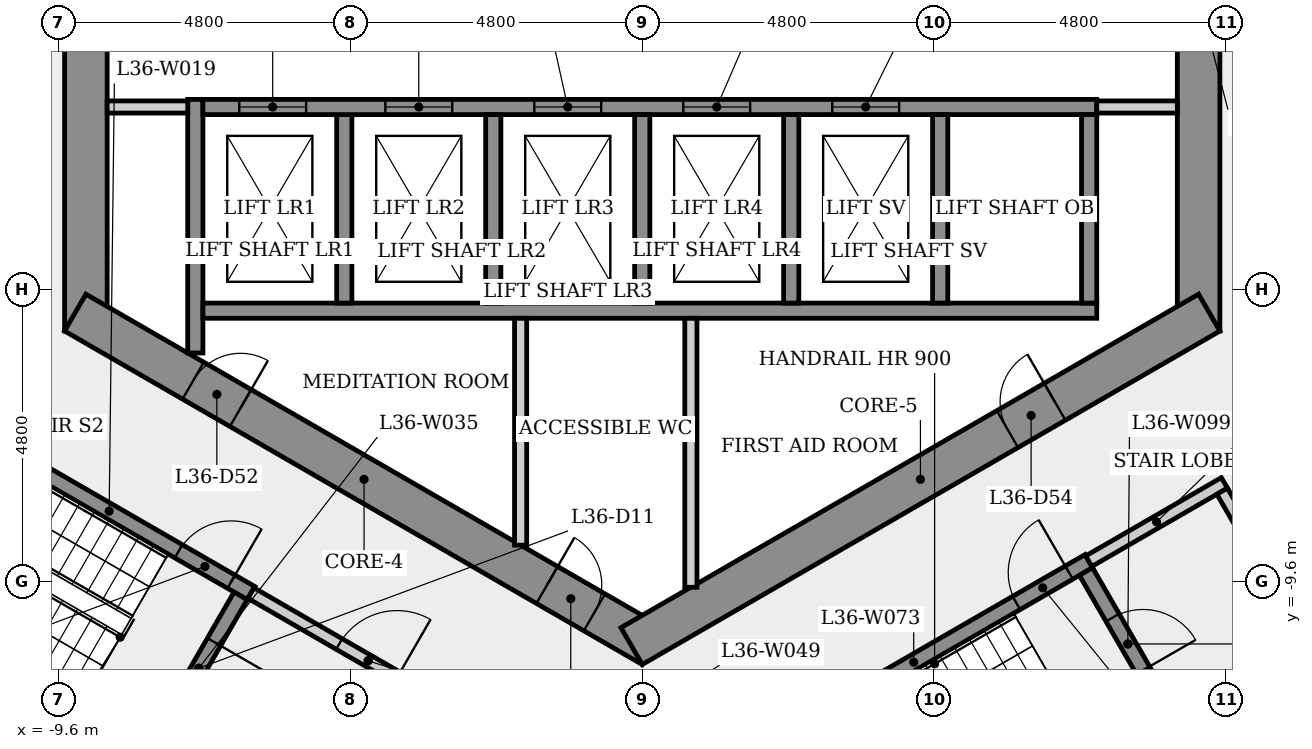
"""IFC4 building model, lengths in metres.
Left out: names, types, materials, properties, quantities, classifications, styles, units other than length and angle.
Written with IfcOpenShell. Run it as: python <this file> out.ifc"""

import sys

from ifc_helpers import new_model, si_unit, direction, frame, frame_2d, origin, place, context, subcontext, project, spatial, rectangle, extrude, element, fill, save


model = new_model("IFC4")
c1 = context("Model", 3, precision=1e-05, world=origin(), true_north=direction((0.0, 1.0)))
c2 = subcontext(c1, "Body", "Model", "MODEL_VIEW")
j1 = project(units=[si_unit("LENGTHUNIT", "METRE"), si_unit("PLANEANGLEUNIT", "RADIAN")], contexts=[c1])
p1 = place(None, origin())
s1 = spatial("IfcSite", under=j1, at=p1, CompositionType="ELEMENT")
p2 = place(p1, origin())
s2 = spatial("IfcBuilding", under=s1, at=p2, CompositionType="ELEMENT")
p3 = place(p2, frame((0.0, 0.0, 135.9)))
s3 = spatial("IfcBuildingStorey", under=s2, at=p3, CompositionType="ELEMENT", Elevation=135.9)
p4 = place(p3, frame((9.15, -5.485, 0.0), z_axis=(0.0, 0.0, 1.0), x_axis=(0.0, 1.0, 0.0)))
e1 = element("IfcWall", 1, at=p4, inside=s3, PredefinedType="SHEAR", context=c2, shape_type="SweptSolid", body=[
    extrude(rectangle(XDim=10.97, YDim=0.7, at=frame_2d((5.485, 0.0))), origin(), (0.0, 0.0, 1.0), 4.0),
])
p5 = place(p4, frame((4.685, 0.0, 0.0)))
e2 = element("IfcOpeningElement", 2, at=p5, cuts=e1, PredefinedType="OPENING", context=c2, shape_type="SweptSolid", body=[
    extrude(rectangle(XDim=1.6, YDim=2.1, at=frame_2d((0.8, 1.05))), frame((0.0, 0.36, 0.0), z_axis=(0.0, -1.0, 0.0), x_axis=(1.0, 0.0, 0.0)), (0.0, 0.0, 1.0), 0.72),
])
p6 = place(p3, frame((-9.15, 5.485, 0.0), z_axis=(0.0, 0.0, 1.0), x_axis=(0.0, -1.0, 0.0)))
e3 = element("IfcWall", 3, at=p6, inside=s3, PredefinedType="SHEAR", context=c2, shape_type="SweptSolid", body=[
    extrude(rectangle(XDim=10.97, YDim=0.7, at=frame_2d((5.485, 0.0))), origin(), (0.0, 0.0, 1.0), 4.0),
])
p7 = place(p6, frame((4.685, 0.0, 0.0)))
e4 = element("IfcOpeningElement", 4, at=p7, cuts=e3, PredefinedType="OPENING", context=c2, shape_type="SweptSolid", body=[
    extrude(rectangle(XDim=1.6, YDim=2.1, at=frame_2d((0.8, 1.05))), frame((0.0, 0.36, 0.0), z_axis=(0.0, -1.0, 0.0), x_axis=(1.0, 0.0, 0.0)), (0.0, 0.0, 1.0), 0.72),
])
p8 = place(p3, frame((-9.325, -5.182, 0.0), z_axis=(0.0, 0.0, 1.0), x_axis=(0.866023993627, -0.500002442456, 0.0)))
e5 = element("IfcWall", 5, at=p8, inside=s3, PredefinedType="SHEAR", context=c2, shape_type="SweptSolid", body=[
    extrude(rectangle(XDim=10.97, YDim=0.7, at=frame_2d((5.485, 0.0))), origin(), (0.0, 0.0, 1.0), 4.0),
])
p9 = place(p8, frame((2.239, 0.0, 0.0)))
e6 = element("IfcOpeningElement", 6, at=p9, cuts=e5, PredefinedType="OPENING", context=c2, shape_type="SweptSolid", body=[
    extrude(rectangle(XDim=0.9, YDim=2.1, at=frame_2d((0.45, 1.05))), frame((0.0, 0.36, 0.0), z_axis=(0.0, -1.0, 0.0), x_axis=(1.0, 0.0, 0.0)), (0.0, 0.0, 1.0), 0.72),
])
p10 = place(p8, frame((8.96, 0.0, 0.0)))
e7 = element("IfcOpeningElement", 7, at=p10, cuts=e5, PredefinedType="OPENING", context=c2, shape_type="SweptSolid", body=[
    extrude(rectangle(XDim=0.9, YDim=2.1, at=frame_2d((0.45, 1.05))), frame((0.0, 0.36, 0.0), z_axis=(0.0, -1.0, 0.0), x_axis=(1.0, 0.0, 0.0)), (0.0, 0.0, 1.0), 0.72),
])
p11 = place(p3, frame((-0.175, -10.667, 0.0), z_axis=(0.0, 0.0, 1.0), x_axis=(0.866023993627, 0.500002442456, 0.0)))
e8 = element("IfcWall", 8, at=p11, inside=s3, PredefinedType="SHEAR", context=c2, shape_type="SweptSolid", body=[
    extrude(rectangle(XDim=10.97, YDim=0.7, at=frame_2d((5.485, 0.0))), origin(), (0.0, 0.0, 1.0), 4.0),
])
p12 = place(p11, frame((7.137, 0.0, 0.0)))
e9 = element("IfcOpeningElement", 9, at=p12, cuts=e8, PredefinedType="OPENING", context=c2, shape_type="SweptSolid", body=[
    extrude(rectangle(XDim=0.9, YDim=2.1, at=frame_2d((0.45, 1.05))), frame((0.0, 0.36, 0.0), z_axis=(0.0, -1.0, 0.0), x_axis=(1.0, 0.0, 0.0)), (0.0, 0.0, 1.0), 0.72),
])
p13 = place(p3, frame((-11.1, -7.101, 0.0), z_axis=(0.0, 0.0, 1.0), x_axis=(0.866028615007, -0.499994437958, 0.0)))
e10 = element("IfcWall", 10, at=p13, inside=s3, PredefinedType="SHEAR", context=c2, shape_type="SweptSolid", body=[
    extrude(rectangle(XDim=5.387, YDim=0.25, at=frame_2d((2.694, 0.0))), origin(), (0.0, 0.0, 1.0), 3.6),
])
p14 = place(p13, frame((4.012, 0.0, 0.0)))
e11 = element("IfcOpeningElement", 11, at=p14, cuts=e10, PredefinedType="OPENING", context=c2, shape_type="SweptSolid", body=[
    extrude(rectangle(XDim=1.0, YDim=2.1, at=frame_2d((0.5, 1.05))), frame((0.0, 0.135, 0.0), z_axis=(0.0, -1.0, 0.0), x_axis=(1.0, 0.0, 0.0)), (0.0, 0.0, 1.0), 0.27),
])
p15 = place(p3, frame((-7.935, -12.393, 0.0), z_axis=(0.0, 0.0, 1.0), x_axis=(-0.866025499775, 0.499999833739, 0.0)))
e12 = element("IfcWall", 12, at=p15, inside=s3, PredefinedType="SHEAR", context=c2, shape_type="SweptSolid", body=[
    extrude(rectangle(XDim=6.4, YDim=0.25, at=frame_2d((3.2, 0.0))), origin(), (0.0, 0.0, 1.0), 3.6),
])
p16 = place(p3, frame((-7.35, -5.846, 0.0), z_axis=(0.0, 0.0, 1.0), x_axis=(0.0, 1.0, 0.0)))
e13 = element("IfcWall", 13, at=p16, inside=s3, PredefinedType="SHEAR", context=c2, shape_type="SweptSolid", body=[
    extrude(rectangle(XDim=4.171, YDim=0.25, at=frame_2d((2.085, 0.0))), origin(), (0.0, 0.0, 1.0), 3.6),
])
p17 = place(p3, frame((-7.475, -1.8, 0.0), z_axis=(0.0, 0.0, 1.0), x_axis=(-1.0, 0.0, 0.0)))
e14 = element("IfcWall", 14, at=p17, inside=s3, PredefinedType="PARTITIONING", context=c2, shape_type="SweptSolid", body=[
    extrude(rectangle(XDim=1.325, YDim=0.2, at=frame_2d((0.663, 0.0))), origin(), (0.0, 0.0, 1.0), 3.6),
])
p18 = place(p3, frame((-6.605, -9.841, 0.0), z_axis=(0.0, 0.0, 1.0), x_axis=(-0.499996545922, -0.866027397988, 0.0)))
e15 = element("IfcWall", 15, at=p18, inside=s3, PredefinedType="SHEAR", context=c2, shape_type="SweptSolid", body=[
    extrude(rectangle(XDim=2.75, YDim=0.25, at=frame_2d((1.375, 0.0))), origin(), (0.0, 0.0, 1.0), 3.6),
])
p19 = place(p18, frame((0.875, 0.0, 0.0)))
e16 = element("IfcOpeningElement", 16, at=p19, cuts=e15, PredefinedType="OPENING", context=c2, shape_type="SweptSolid", body=[
    extrude(rectangle(XDim=1.0, YDim=2.1, at=frame_2d((0.5, 1.05))), frame((0.0, 0.135, 0.0), z_axis=(0.0, -1.0, 0.0), x_axis=(1.0, 0.0, 0.0)), (0.0, 0.0, 1.0), 0.27),
])
p20 = place(p3, frame((-6.435, -9.795, 0.0), z_axis=(0.0, 0.0, 1.0), x_axis=(0.866012907634, -0.500021643343, 0.0)))
e17 = element("IfcWall", 17, at=p20, inside=s3, PredefinedType="PARTITIONING", context=c2, shape_type="SweptSolid", body=[
    extrude(rectangle(XDim=4.45, YDim=0.2, at=frame_2d((2.225, 0.0))), origin(), (0.0, 0.0, 1.0), 3.6),
])
p21 = place(p20, frame((1.675, 0.0, 0.0)))
e18 = element("IfcOpeningElement", 18, at=p21, cuts=e17, PredefinedType="OPENING", context=c2, shape_type="SweptSolid", body=[
    extrude(rectangle(XDim=1.1, YDim=2.1, at=frame_2d((0.55, 1.05))), frame((0.0, 0.11, 0.0), z_axis=(0.0, -1.0, 0.0), x_axis=(1.0, 0.0, 0.0)), (0.0, 0.0, 1.0), 0.22),
])
p22 = place(p3, frame((-7.225, -5.15, 0.0), z_axis=(0.0, 0.0, 1.0), x_axis=(1.0, 0.0, 0.0)))
e19 = element("IfcWall", 19, at=p22, inside=s3, PredefinedType="SHEAR", context=c2, shape_type="SweptSolid", body=[
    extrude(rectangle(XDim=14.7, YDim=0.25, at=frame_2d((7.35, 0.0))), origin(), (0.0, 0.0, 1.0), 3.6),
])
p23 = place(p3, frame((-4.9, -1.925, 0.0), z_axis=(0.0, 0.0, 1.0), x_axis=(0.0, -1.0, 0.0)))
e20 = element("IfcWall", 20, at=p23, inside=s3, PredefinedType="SHEAR", context=c2, shape_type="SweptSolid", body=[
    extrude(rectangle(XDim=3.1, YDim=0.25, at=frame_2d((1.55, 0.0))), origin(), (0.0, 0.0, 1.0), 4.0),
])
p24 = place(p3, frame((-7.225, -1.8, 0.0), z_axis=(0.0, 0.0, 1.0), x_axis=(1.0, 0.0, 0.0)))
e21 = element("IfcWall", 21, at=p24, inside=s3, PredefinedType="SHEAR", context=c2, shape_type="SweptSolid", body=[
    extrude(rectangle(XDim=14.7, YDim=0.25, at=frame_2d((7.35, 0.0))), origin(), (0.0, 0.0, 1.0), 3.6),
])
p25 = place(p24, frame((0.597, 0.0, 0.0)))
e22 = element("IfcOpeningElement", 22, at=p25, cuts=e21, PredefinedType="OPENING", context=c2, shape_type="SweptSolid", body=[
    extrude(rectangle(XDim=1.1, YDim=2.1, at=frame_2d((0.55, 1.05))), frame((0.0, 0.135, 0.0), z_axis=(0.0, -1.0, 0.0), x_axis=(1.0, 0.0, 0.0)), (0.0, 0.0, 1.0), 0.27),
])
p26 = place(p24, frame((3.0, 0.0, 0.0)))
e23 = element("IfcOpeningElement", 23, at=p26, cuts=e21, PredefinedType="OPENING", context=c2, shape_type="SweptSolid", body=[
    extrude(rectangle(XDim=1.1, YDim=2.1, at=frame_2d((0.55, 1.05))), frame((0.0, 0.135, 0.0), z_axis=(0.0, -1.0, 0.0), x_axis=(1.0, 0.0, 0.0)), (0.0, 0.0, 1.0), 0.27),
])
p27 = place(p24, frame((5.45, 0.0, 0.0)))
e24 = element("IfcOpeningElement", 24, at=p27, cuts=e21, PredefinedType="OPENING", context=c2, shape_type="SweptSolid", body=[
    extrude(rectangle(XDim=1.1, YDim=2.1, at=frame_2d((0.55, 1.05))), frame((0.0, 0.135, 0.0), z_axis=(0.0, -1.0, 0.0), x_axis=(1.0, 0.0, 0.0)), (0.0, 0.0, 1.0), 0.27),
])
p28 = place(p24, frame((7.9, 0.0, 0.0)))
e25 = element("IfcOpeningElement", 25, at=p28, cuts=e21, PredefinedType="OPENING", context=c2, shape_type="SweptSolid", body=[
    extrude(rectangle(XDim=1.1, YDim=2.1, at=frame_2d((0.55, 1.05))), frame((0.0, 0.135, 0.0), z_axis=(0.0, -1.0, 0.0), x_axis=(1.0, 0.0, 0.0)), (0.0, 0.0, 1.0), 0.27),
])
p29 = place(p24, frame((10.35, 0.0, 0.0)))
e26 = element("IfcOpeningElement", 26, at=p29, cuts=e21, PredefinedType="OPENING", context=c2, shape_type="SweptSolid", body=[
    extrude(rectangle(XDim=1.1, YDim=2.1, at=frame_2d((0.55, 1.05))), frame((0.0, 0.135, 0.0), z_axis=(0.0, -1.0, 0.0), x_axis=(1.0, 0.0, 0.0)), (0.0, 0.0, 1.0), 0.27),
])
p30 = place(p3, frame((-2.45, -1.925, 0.0), z_axis=(0.0, 0.0, 1.0), x_axis=(0.0, -1.0, 0.0)))
e27 = element("IfcWall", 27, at=p30, inside=s3, PredefinedType="SHEAR", context=c2, shape_type="SweptSolid", body=[
    extrude(rectangle(XDim=3.1, YDim=0.25, at=frame_2d((1.55, 0.0))), origin(), (0.0, 0.0, 1.0), 4.0),
])
p31 = place(p3, frame((-2.0, -5.275, 0.0), z_axis=(0.0, 0.0, 1.0), x_axis=(0.0, -1.0, 0.0)))
e28 = element("IfcWall", 28, at=p31, inside=s3, PredefinedType="PARTITIONING", context=c2, shape_type="SweptSolid", body=[
    extrude(rectangle(XDim=3.732, YDim=0.2, at=frame_2d((1.866, 0.0))), origin(), (0.0, 0.0, 1.0), 3.6),
])
p32 = place(p3, frame((0.0, -1.925, 0.0), z_axis=(0.0, 0.0, 1.0), x_axis=(0.0, -1.0, 0.0)))
e29 = element("IfcWall", 29, at=p32, inside=s3, PredefinedType="SHEAR", context=c2, shape_type="SweptSolid", body=[
    extrude(rectangle(XDim=3.1, YDim=0.25, at=frame_2d((1.55, 0.0))), origin(), (0.0, 0.0, 1.0), 4.0),
])
p33 = place(p3, frame((0.8, -5.275, 0.0), z_axis=(0.0, 0.0, 1.0), x_axis=(0.0, -1.0, 0.0)))
e30 = element("IfcWall", 30, at=p33, inside=s3, PredefinedType="PARTITIONING", context=c2, shape_type="SweptSolid", body=[
    extrude(rectangle(XDim=4.425, YDim=0.2, at=frame_2d((2.212, 0.0))), origin(), (0.0, 0.0, 1.0), 3.6),
])
p34 = place(p3, frame((1.585, -12.595, 0.0), z_axis=(0.0, 0.0, 1.0), x_axis=(0.866036417653, 0.499980922934, 0.0)))
e31 = element("IfcWall", 31, at=p34, inside=s3, PredefinedType="SHEAR", context=c2, shape_type="SweptSolid", body=[
    extrude(rectangle(XDim=6.65, YDim=0.25, at=frame_2d((3.325, 0.0))), origin(), (0.0, 0.0, 1.0), 3.6),
])
p35 = place(p34, frame((5.275, 0.0, 0.0)))
e32 = element("IfcOpeningElement", 32, at=p35, cuts=e31, PredefinedType="OPENING", context=c2, shape_type="SweptSolid", body=[
    extrude(rectangle(XDim=1.0, YDim=2.1, at=frame_2d((0.5, 1.05))), frame((0.0, 0.135, 0.0), z_axis=(0.0, -1.0, 0.0), x_axis=(1.0, 0.0, 0.0)), (0.0, 0.0, 1.0), 0.27),
])
for number, where, z_axis, x_axis in (
    (33, (2.45, -1.925, 0.0), (0.0, 0.0, 1.0), (0.0, -1.0, 0.0)),
    (34, (4.9, -1.925, 0.0), (0.0, 0.0, 1.0), (0.0, -1.0, 0.0)),
):
    element("IfcWall", number, at=place(p3, frame(where, z_axis=z_axis, x_axis=x_axis)), inside=s3, PredefinedType="SHEAR", context=c2, shape_type="SweptSolid", body=[
        extrude(rectangle(XDim=3.1, YDim=0.25, at=frame_2d((1.55, 0.0))), origin(), (0.0, 0.0, 1.0), 4.0),
    ])
p36 = place(p3, frame((7.298, -9.441, 0.0), z_axis=(0.0, 0.0, 1.0), x_axis=(0.500034990121, -0.866005201286, 0.0)))
e35 = element("IfcWall", 35, at=p36, inside=s3, PredefinedType="SHEAR", context=c2, shape_type="SweptSolid", body=[
    extrude(rectangle(XDim=2.75, YDim=0.25, at=frame_2d((1.375, 0.0))), origin(), (0.0, 0.0, 1.0), 3.6),
])
p37 = place(p36, frame((0.875, 0.0, 0.0)))
e36 = element("IfcOpeningElement", 36, at=p37, cuts=e35, PredefinedType="OPENING", context=c2, shape_type="SweptSolid", body=[
    extrude(rectangle(XDim=1.0, YDim=2.1, at=frame_2d((0.5, 1.05))), frame((0.0, 0.135, 0.0), z_axis=(0.0, -1.0, 0.0), x_axis=(1.0, 0.0, 0.0)), (0.0, 0.0, 1.0), 0.27),
])
p38 = place(p3, frame((7.344, -9.27, 0.0), z_axis=(0.0, 0.0, 1.0), x_axis=(0.866005588531, 0.500034319456, 0.0)))
e37 = element("IfcWall", 37, at=p38, inside=s3, PredefinedType="PARTITIONING", context=c2, shape_type="SweptSolid", body=[
    extrude(rectangle(XDim=2.575, YDim=0.2, at=frame_2d((1.288, 0.0))), origin(), (0.0, 0.0, 1.0), 3.6),
])
p39 = place(p3, frame((7.35, -1.925, 0.0), z_axis=(0.0, 0.0, 1.0), x_axis=(0.0, -1.0, 0.0)))
e38 = element("IfcWall", 38, at=p39, inside=s3, PredefinedType="SHEAR", context=c2, shape_type="SweptSolid", body=[
    extrude(rectangle(XDim=3.1, YDim=0.25, at=frame_2d((1.55, 0.0))), origin(), (0.0, 0.0, 1.0), 4.0),
])
p40 = place(p3, frame((8.8, -1.8, 0.0), z_axis=(0.0, 0.0, 1.0), x_axis=(-1.0, 0.0, 0.0)))
e39 = element("IfcWall", 39, at=p40, inside=s3, PredefinedType="PARTITIONING", context=c2, shape_type="SweptSolid", body=[
    extrude(rectangle(XDim=1.325, YDim=0.2, at=frame_2d((0.663, 0.0))), origin(), (0.0, 0.0, 1.0), 3.6),
])
p41 = place(p3, frame((9.537, -8.119, 0.0), z_axis=(0.0, 0.0, 1.0), x_axis=(0.499990139034, -0.866031096941, 0.0)))
e40 = element("IfcWall", 40, at=p41, inside=s3, PredefinedType="PARTITIONING", context=c2, shape_type="SweptSolid", body=[
    extrude(rectangle(XDim=3.0, YDim=0.2, at=frame_2d((1.5, 0.0))), origin(), (0.0, 0.0, 1.0), 3.6),
])
p42 = place(p41, frame((0.935, 0.0, 0.0)))
e41 = element("IfcOpeningElement", 41, at=p42, cuts=e40, PredefinedType="OPENING", context=c2, shape_type="SweptSolid", body=[
    extrude(rectangle(XDim=1.0, YDim=2.1, at=frame_2d((0.5, 1.05))), frame((0.0, 0.11, 0.0), z_axis=(0.0, -1.0, 0.0), x_axis=(1.0, 0.0, 0.0)), (0.0, 0.0, 1.0), 0.22),
])
p43 = place(p3, frame((10.901, -10.681, 0.0), z_axis=(0.0, 0.0, 1.0), x_axis=(-0.866007538022, -0.500030943131, 0.0)))
e42 = element("IfcWall", 42, at=p43, inside=s3, PredefinedType="PLUMBINGWALL", context=c2, shape_type="SweptSolid", body=[
    extrude(rectangle(XDim=2.375, YDim=0.2, at=frame_2d((1.188, 0.0))), origin(), (0.0, 0.0, 1.0), 3.6),
])
p44 = place(p25, origin())
e43 = element("IfcDoor", 43, at=p44, inside=s3, OperationType="SLIDING_TO_LEFT", PredefinedType="DOOR", context=c2, shape_type="SweptSolid", body=[
    extrude(rectangle(XDim=1.1, YDim=2.1, at=frame_2d((0.55, 1.05))), frame((0.0, 0.025, 0.0), z_axis=(0.0, -1.0, 0.0), x_axis=(1.0, 0.0, 0.0)), (0.0, 0.0, 1.0), 0.05),
])
fill(e22, e43)
p45 = place(p26, origin())
e44 = element("IfcDoor", 44, at=p45, inside=s3, OperationType="SLIDING_TO_LEFT", PredefinedType="DOOR", context=c2, shape_type="SweptSolid", body=[
    extrude(rectangle(XDim=1.1, YDim=2.1, at=frame_2d((0.55, 1.05))), frame((0.0, 0.025, 0.0), z_axis=(0.0, -1.0, 0.0), x_axis=(1.0, 0.0, 0.0)), (0.0, 0.0, 1.0), 0.05),
])
fill(e23, e44)
p46 = place(p27, origin())
e45 = element("IfcDoor", 45, at=p46, inside=s3, OperationType="SLIDING_TO_LEFT", PredefinedType="DOOR", context=c2, shape_type="SweptSolid", body=[
    extrude(rectangle(XDim=1.1, YDim=2.1, at=frame_2d((0.55, 1.05))), frame((0.0, 0.025, 0.0), z_axis=(0.0, -1.0, 0.0), x_axis=(1.0, 0.0, 0.0)), (0.0, 0.0, 1.0), 0.05),
])
fill(e24, e45)
p47 = place(p28, origin())
e46 = element("IfcDoor", 46, at=p47, inside=s3, OperationType="SLIDING_TO_LEFT", PredefinedType="DOOR", context=c2, shape_type="SweptSolid", body=[
    extrude(rectangle(XDim=1.1, YDim=2.1, at=frame_2d((0.55, 1.05))), frame((0.0, 0.025, 0.0), z_axis=(0.0, -1.0, 0.0), x_axis=(1.0, 0.0, 0.0)), (0.0, 0.0, 1.0), 0.05),
])
fill(e25, e46)
p48 = place(p29, origin())
e47 = element("IfcDoor", 47, at=p48, inside=s3, OperationType="SLIDING_TO_LEFT", PredefinedType="DOOR", context=c2, shape_type="SweptSolid", body=[
    extrude(rectangle(XDim=1.1, YDim=2.1, at=frame_2d((0.55, 1.05))), frame((0.0, 0.025, 0.0), z_axis=(0.0, -1.0, 0.0), x_axis=(1.0, 0.0, 0.0)), (0.0, 0.0, 1.0), 0.05),
])
fill(e26, e47)
p49 = place(p14, origin())
e48 = element("IfcDoor", 48, at=p49, inside=s3, OperationType="SINGLE_SWING_RIGHT", PredefinedType="DOOR", context=c2, shape_type="SweptSolid", body=[
    extrude(rectangle(XDim=1.0, YDim=2.1, at=frame_2d((0.5, 1.05))), frame((0.0, 0.025, 0.0), z_axis=(0.0, -1.0, 0.0), x_axis=(1.0, 0.0, 0.0)), (0.0, 0.0, 1.0), 0.05),
])
fill(e11, e48)
p50 = place(p19, origin())
e49 = element("IfcDoor", 49, at=p50, inside=s3, OperationType="SINGLE_SWING_LEFT", PredefinedType="DOOR", context=c2, shape_type="SweptSolid", body=[
    extrude(rectangle(XDim=1.0, YDim=2.1, at=frame_2d((0.5, 1.05))), frame((0.0, 0.025, 0.0), z_axis=(0.0, -1.0, 0.0), x_axis=(1.0, 0.0, 0.0)), (0.0, 0.0, 1.0), 0.05),
])
fill(e16, e49)
p51 = place(p21, origin())
e50 = element("IfcDoor", 50, at=p51, inside=s3, OperationType="SINGLE_SWING_RIGHT", PredefinedType="DOOR", context=c2, shape_type="SweptSolid", body=[
    extrude(rectangle(XDim=1.1, YDim=2.1, at=frame_2d((0.55, 1.05))), frame((0.0, 0.025, 0.0), z_axis=(0.0, -1.0, 0.0), x_axis=(1.0, 0.0, 0.0)), (0.0, 0.0, 1.0), 0.05),
])
fill(e18, e50)
p52 = place(p35, origin())
e51 = element("IfcDoor", 51, at=p52, inside=s3, OperationType="SINGLE_SWING_RIGHT", PredefinedType="DOOR", context=c2, shape_type="SweptSolid", body=[
    extrude(rectangle(XDim=1.0, YDim=2.1, at=frame_2d((0.5, 1.05))), frame((0.0, 0.025, 0.0), z_axis=(0.0, -1.0, 0.0), x_axis=(1.0, 0.0, 0.0)), (0.0, 0.0, 1.0), 0.05),
])
fill(e32, e51)
p53 = place(p37, origin())
e52 = element("IfcDoor", 52, at=p53, inside=s3, OperationType="SINGLE_SWING_RIGHT", PredefinedType="DOOR", context=c2, shape_type="SweptSolid", body=[
    extrude(rectangle(XDim=1.0, YDim=2.1, at=frame_2d((0.5, 1.05))), frame((0.0, 0.025, 0.0), z_axis=(0.0, -1.0, 0.0), x_axis=(1.0, 0.0, 0.0)), (0.0, 0.0, 1.0), 0.05),
])
fill(e36, e52)
p54 = place(p9, origin())
e53 = element("IfcDoor", 53, at=p54, inside=s3, OperationType="SINGLE_SWING_RIGHT", PredefinedType="DOOR", context=c2, shape_type="SweptSolid", body=[
    extrude(rectangle(XDim=0.9, YDim=2.1, at=frame_2d((0.45, 1.05))), frame((0.0, 0.025, 0.0), z_axis=(0.0, -1.0, 0.0), x_axis=(1.0, 0.0, 0.0)), (0.0, 0.0, 1.0), 0.05),
])
fill(e6, e53)
p55 = place(p10, origin())
e54 = element("IfcDoor", 54, at=p55, inside=s3, OperationType="SINGLE_SWING_LEFT", PredefinedType="DOOR", context=c2, shape_type="SweptSolid", body=[
    extrude(rectangle(XDim=0.9, YDim=2.1, at=frame_2d((0.45, 1.05))), frame((0.0, 0.025, 0.0), z_axis=(0.0, -1.0, 0.0), x_axis=(1.0, 0.0, 0.0)), (0.0, 0.0, 1.0), 0.05),
])
fill(e7, e54)
p56 = place(p12, origin())
e55 = element("IfcDoor", 55, at=p56, inside=s3, OperationType="SINGLE_SWING_RIGHT", PredefinedType="DOOR", context=c2, shape_type="SweptSolid", body=[
    extrude(rectangle(XDim=0.9, YDim=2.1, at=frame_2d((0.45, 1.05))), frame((0.0, 0.025, 0.0), z_axis=(0.0, -1.0, 0.0), x_axis=(1.0, 0.0, 0.0)), (0.0, 0.0, 1.0), 0.05),
])
fill(e9, e55)
save(model, sys.argv[1])
